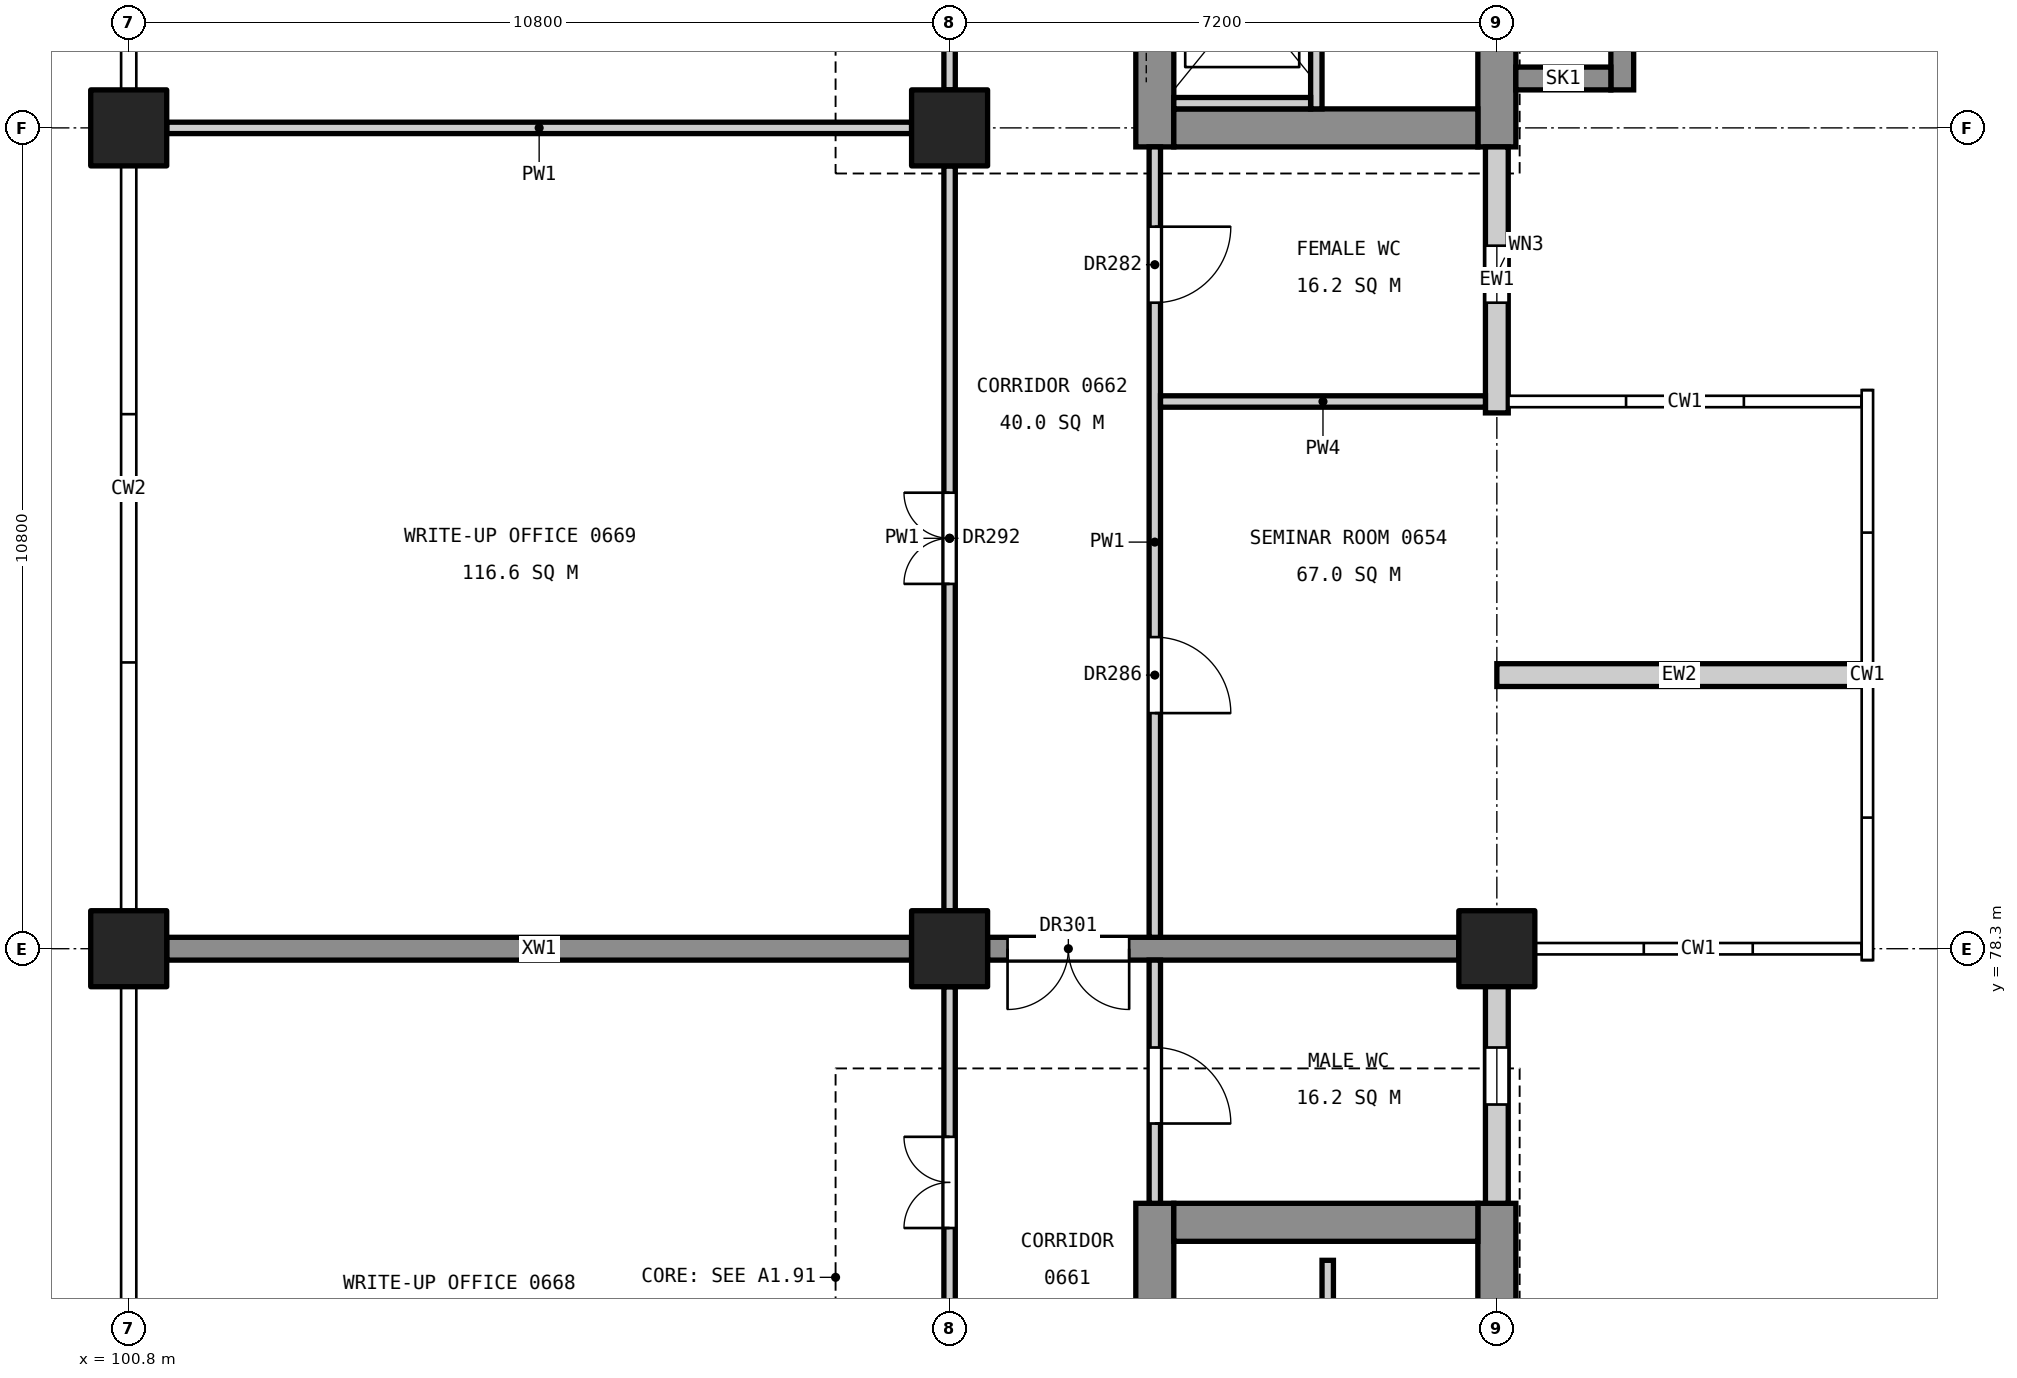
"""IFC4 building model, lengths in metres.
Left out: names, types, materials, properties, quantities, classifications, styles, units other than length and angle.
Written with IfcOpenShell. Run it as: python <this file> out.ifc"""

import sys

from ifc_helpers import new_model, si_unit, direction, frame, frame_2d, origin, origin_2d, place, context, subcontext, project, spatial, rectangle, extrude, element, fill, save


model = new_model("IFC4")
c1 = context("Model", 3, precision=1e-05, world=origin(), true_north=direction((0.0, 1.0)))
c2 = subcontext(c1, "Body", "Model", "MODEL_VIEW")
j1 = project(units=[si_unit("LENGTHUNIT", "METRE"), si_unit("PLANEANGLEUNIT", "RADIAN")], contexts=[c1])
p1 = place(None, origin())
s1 = spatial("IfcSite", under=j1, at=p1, CompositionType="ELEMENT")
p2 = place(p1, origin())
s2 = spatial("IfcBuilding", under=s1, at=p2, CompositionType="ELEMENT")
p3 = place(p2, frame((0.0, 0.0, 31.8)))
s3 = spatial("IfcBuildingStorey", under=s2, at=p3, CompositionType="ELEMENT", Elevation=31.8)
for number, where, z_axis, x_axis in (
    (1, (118.8, 78.3, 0.0), (0.0, 0.0, 1.0), (1.0, 0.0, 0.0)),
    (2, (111.6, 78.3, 0.0), (0.0, 0.0, 1.0), (1.0, 0.0, 0.0)),
    (3, (111.6, 89.1, 0.0), (0.0, 0.0, 1.0), (1.0, 0.0, 0.0)),
    (4, (100.8, 78.3, 0.0), (0.0, 0.0, 1.0), (1.0, 0.0, 0.0)),
    (5, (100.8, 89.1, 0.0), (0.0, 0.0, 1.0), (1.0, 0.0, 0.0)),
):
    element("IfcColumn", number, at=place(p3, frame(where, z_axis=z_axis, x_axis=x_axis)), inside=s3, PredefinedType="COLUMN", context=c2, shape_type="SweptSolid", body=[
        extrude(rectangle(XDim=1.0, YDim=1.0, at=origin_2d()), origin(), (0.0, 0.0, 1.0), 4.8),
    ])
p4 = place(p3, frame((118.8, 60.05, 0.0), z_axis=(0.0, 0.0, 1.0), x_axis=(0.0, 1.0, 0.0)))
e6 = element("IfcWall", 6, at=p4, inside=s3, PredefinedType="SHEAR", context=c2, shape_type="SweptSolid", body=[
    extrude(rectangle(XDim=14.9, YDim=0.5, at=frame_2d((7.45, 0.0))), origin(), (0.0, 0.0, 1.0), 4.55),
])
p5 = place(p4, frame((6.16, 0.0, 3.4)))
e7 = element("IfcOpeningElement", 7, at=p5, cuts=e6, PredefinedType="OPENING", context=c2, shape_type="SweptSolid", body=[
    extrude(rectangle(XDim=1.2, YDim=0.9, at=frame_2d((0.6, 0.45))), frame((0.0, 0.26, 0.0), z_axis=(0.0, -1.0, 0.0), x_axis=(1.0, 0.0, 0.0)), (0.0, 0.0, 1.0), 0.52),
])
p6 = place(p3, frame((114.3, 60.05, 0.0), z_axis=(0.0, 0.0, 1.0), x_axis=(0.0, 1.0, 0.0)))
e8 = element("IfcWall", 8, at=p6, inside=s3, PredefinedType="SHEAR", context=c2, shape_type="SweptSolid", body=[
    extrude(rectangle(XDim=14.9, YDim=0.5, at=frame_2d((7.45, 0.0))), origin(), (0.0, 0.0, 1.0), 4.55),
])
p7 = place(p6, frame((0.55, 0.0, 0.0)))
e9 = element("IfcOpeningElement", 9, at=p7, cuts=e8, PredefinedType="OPENING", context=c2, shape_type="SweptSolid", body=[
    extrude(rectangle(XDim=1.4, YDim=2.1, at=frame_2d((0.7, 1.05))), frame((0.0, 0.26, 0.0), z_axis=(0.0, -1.0, 0.0), x_axis=(1.0, 0.0, 0.0)), (0.0, 0.0, 1.0), 0.52),
])
p8 = place(p6, frame((8.85, 0.0, 0.0)))
e10 = element("IfcOpeningElement", 10, at=p8, cuts=e8, PredefinedType="OPENING", context=c2, shape_type="SweptSolid", body=[
    extrude(rectangle(XDim=1.1, YDim=2.1, at=frame_2d((0.55, 1.05))), frame((0.0, 0.26, 0.0), z_axis=(0.0, -1.0, 0.0), x_axis=(1.0, 0.0, 0.0)), (0.0, 0.0, 1.0), 0.52),
])
p9 = place(p6, frame((11.4, 0.0, 0.0)))
e11 = element("IfcOpeningElement", 11, at=p9, cuts=e8, PredefinedType="OPENING", context=c2, shape_type="SweptSolid", body=[
    extrude(rectangle(XDim=1.1, YDim=2.1, at=frame_2d((0.55, 1.05))), frame((0.0, 0.26, 0.0), z_axis=(0.0, -1.0, 0.0), x_axis=(1.0, 0.0, 0.0)), (0.0, 0.0, 1.0), 0.52),
])
p10 = place(p3, frame((118.55, 74.7, 0.0), z_axis=(0.0, 0.0, 1.0), x_axis=(-1.0, 0.0, 0.0)))
e12 = element("IfcWall", 12, at=p10, inside=s3, PredefinedType="SHEAR", context=c2, shape_type="SweptSolid", body=[
    extrude(rectangle(XDim=4.0, YDim=0.5, at=frame_2d((2.0, 0.0))), origin(), (0.0, 0.0, 1.0), 4.55),
])
p11 = place(p3, frame((118.8, 88.85, 0.0), z_axis=(0.0, 0.0, 1.0), x_axis=(0.0, 1.0, 0.0)))
e13 = element("IfcWall", 13, at=p11, inside=s3, PredefinedType="SHEAR", context=c2, shape_type="SweptSolid", body=[
    extrude(rectangle(XDim=11.3, YDim=0.5, at=frame_2d((5.65, 0.0))), origin(), (0.0, 0.0, 1.0), 4.55),
])
p12 = place(p11, frame((3.94, 0.0, 3.4)))
e14 = element("IfcOpeningElement", 14, at=p12, cuts=e13, PredefinedType="OPENING", context=c2, shape_type="SweptSolid", body=[
    extrude(rectangle(XDim=1.2, YDim=0.9, at=frame_2d((0.6, 0.45))), frame((0.0, 0.26, 0.0), z_axis=(0.0, -1.0, 0.0), x_axis=(1.0, 0.0, 0.0)), (0.0, 0.0, 1.0), 0.52),
])
p13 = place(p3, frame((114.3, 88.85, 0.0), z_axis=(0.0, 0.0, 1.0), x_axis=(0.0, 1.0, 0.0)))
e15 = element("IfcWall", 15, at=p13, inside=s3, PredefinedType="SHEAR", context=c2, shape_type="SweptSolid", body=[
    extrude(rectangle(XDim=11.3, YDim=0.5, at=frame_2d((5.65, 0.0))), origin(), (0.0, 0.0, 1.0), 4.55),
])
p14 = place(p13, frame((9.35, 0.0, 0.0)))
e16 = element("IfcOpeningElement", 16, at=p14, cuts=e15, PredefinedType="OPENING", context=c2, shape_type="SweptSolid", body=[
    extrude(rectangle(XDim=1.4, YDim=2.1, at=frame_2d((0.7, 1.05))), frame((0.0, 0.26, 0.0), z_axis=(0.0, -1.0, 0.0), x_axis=(1.0, 0.0, 0.0)), (0.0, 0.0, 1.0), 0.52),
])
p15 = place(p13, frame((1.4, 0.0, 0.0)))
e17 = element("IfcOpeningElement", 17, at=p15, cuts=e15, PredefinedType="OPENING", context=c2, shape_type="SweptSolid", body=[
    extrude(rectangle(XDim=1.1, YDim=2.1, at=frame_2d((0.55, 1.05))), frame((0.0, 0.26, 0.0), z_axis=(0.0, -1.0, 0.0), x_axis=(1.0, 0.0, 0.0)), (0.0, 0.0, 1.0), 0.52),
])
p16 = place(p3, frame((118.55, 89.1, 0.0), z_axis=(0.0, 0.0, 1.0), x_axis=(-1.0, 0.0, 0.0)))
e18 = element("IfcWall", 18, at=p16, inside=s3, PredefinedType="SHEAR", context=c2, shape_type="SweptSolid", body=[
    extrude(rectangle(XDim=4.0, YDim=0.5, at=frame_2d((2.0, 0.0))), origin(), (0.0, 0.0, 1.0), 4.55),
])
p17 = place(p3, frame((120.45, 89.6, 0.0), z_axis=(0.0, 0.0, 1.0), x_axis=(0.0, 1.0, 0.0)))
e19 = element("IfcWall", 19, at=p17, inside=s3, PredefinedType="SHEAR", context=c2, shape_type="SweptSolid", body=[
    extrude(rectangle(XDim=2.4, YDim=0.3, at=frame_2d((1.2, 0.0))), origin(), (0.0, 0.0, 1.0), 4.8),
])
p18 = place(p3, frame((119.05, 89.75, 0.0), z_axis=(0.0, 0.0, 1.0), x_axis=(1.0, 0.0, 0.0)))
e20 = element("IfcWall", 20, at=p18, inside=s3, PredefinedType="SHEAR", context=c2, shape_type="SweptSolid", body=[
    extrude(rectangle(XDim=1.25, YDim=0.3, at=frame_2d((0.625, 0.0))), origin(), (0.0, 0.0, 1.0), 4.8),
])
p19 = place(p3, frame((118.3, 78.3, 0.0), z_axis=(0.0, 0.0, 1.0), x_axis=(-1.0, 0.0, 0.0)))
e21 = element("IfcWall", 21, at=p19, inside=s3, PredefinedType="SHEAR", context=c2, shape_type="SweptSolid", body=[
    extrude(rectangle(XDim=6.2, YDim=0.3, at=frame_2d((3.1, 0.0))), origin(), (0.0, 0.0, 1.0), 4.55),
])
p20 = place(p19, frame((4.337, 0.0, 0.0)))
e22 = element("IfcOpeningElement", 22, at=p20, cuts=e21, PredefinedType="OPENING", context=c2, shape_type="SweptSolid", body=[
    extrude(rectangle(XDim=1.6, YDim=2.1, at=frame_2d((0.8, 1.05))), frame((0.0, 0.16, 0.0), z_axis=(0.0, -1.0, 0.0), x_axis=(1.0, 0.0, 0.0)), (0.0, 0.0, 1.0), 0.32),
])
p21 = place(p3, frame((111.1, 78.3, 0.0), z_axis=(0.0, 0.0, 1.0), x_axis=(-1.0, 0.0, 0.0)))
e23 = element("IfcWall", 23, at=p21, inside=s3, PredefinedType="SHEAR", context=c2, shape_type="SweptSolid", body=[
    extrude(rectangle(XDim=9.8, YDim=0.3, at=frame_2d((4.9, 0.0))), origin(), (0.0, 0.0, 1.0), 4.55),
])
p22 = place(p3, frame((116.425, 92.0, 0.0), z_axis=(0.0, 0.0, 1.0), x_axis=(0.0, -1.0, 0.0)))
e24 = element("IfcWall", 24, at=p22, inside=s3, PredefinedType="SOLIDWALL", context=c2, shape_type="SweptSolid", body=[
    extrude(rectangle(XDim=2.65, YDim=0.15, at=frame_2d((1.325, 0.0))), origin(), (0.0, 0.0, 1.0), 4.8),
])
p23 = place(p3, frame((116.35, 89.425, 0.0), z_axis=(0.0, 0.0, 1.0), x_axis=(-1.0, 0.0, 0.0)))
e25 = element("IfcWall", 25, at=p23, inside=s3, PredefinedType="SOLIDWALL", context=c2, shape_type="SweptSolid", body=[
    extrude(rectangle(XDim=1.8, YDim=0.15, at=frame_2d((0.9, 0.0))), origin(), (0.0, 0.0, 1.0), 4.8),
])
p24 = place(p3, frame((116.575, 73.3, 0.0), z_axis=(0.0, 0.0, 1.0), x_axis=(0.0, 1.0, 0.0)))
e26 = element("IfcWall", 26, at=p24, inside=s3, PredefinedType="SOLIDWALL", context=c2, shape_type="SweptSolid", body=[
    extrude(rectangle(XDim=0.9, YDim=0.15, at=frame_2d((0.45, 0.0))), origin(), (0.0, 0.0, 1.0), 4.8),
])
p25 = place(p3, frame((118.8, 74.95, 0.0), z_axis=(0.0, 0.0, 1.0), x_axis=(0.0, 1.0, 0.0)))
e27 = element("IfcWall", 27, at=p25, inside=s3, PredefinedType="STANDARD", context=c2, shape_type="SweptSolid", body=[
    extrude(rectangle(XDim=3.5, YDim=0.3, at=frame_2d((1.75, 0.0))), origin(), (0.0, 0.0, 1.0), 3.65),
])
p26 = place(p25, frame((1.3, 0.0, 0.8)))
e28 = element("IfcOpeningElement", 28, at=p26, cuts=e27, PredefinedType="OPENING", context=c2, shape_type="SweptSolid", body=[
    extrude(rectangle(XDim=0.75, YDim=1.2, at=frame_2d((0.375, 0.6))), frame((0.0, 0.16, 0.0), z_axis=(0.0, -1.0, 0.0), x_axis=(1.0, 0.0, 0.0)), (0.0, 0.0, 1.0), 0.32),
])
p27 = place(p3, frame((118.8, 85.35, 0.0), z_axis=(0.0, 0.0, 1.0), x_axis=(0.0, 1.0, 0.0)))
e29 = element("IfcWall", 29, at=p27, inside=s3, PredefinedType="STANDARD", context=c2, shape_type="SweptSolid", body=[
    extrude(rectangle(XDim=3.5, YDim=0.3, at=frame_2d((1.75, 0.0))), origin(), (0.0, 0.0, 1.0), 3.65),
])
p28 = place(p27, frame((1.45, 0.0, 0.8)))
e30 = element("IfcOpeningElement", 30, at=p28, cuts=e29, PredefinedType="OPENING", context=c2, shape_type="SweptSolid", body=[
    extrude(rectangle(XDim=0.75, YDim=1.2, at=frame_2d((0.375, 0.6))), frame((0.0, 0.16, 0.0), z_axis=(0.0, -1.0, 0.0), x_axis=(1.0, 0.0, 0.0)), (0.0, 0.0, 1.0), 0.32),
])
p29 = place(p3, frame((123.6, 81.9, 0.0), z_axis=(0.0, 0.0, 1.0), x_axis=(-1.0, 0.0, 0.0)))
e31 = element("IfcWall", 31, at=p29, inside=s3, PredefinedType="STANDARD", context=c2, shape_type="SweptSolid", body=[
    extrude(rectangle(XDim=4.8, YDim=0.3, at=frame_2d((2.4, 0.0))), origin(), (0.0, 0.0, 1.0), 3.65),
])
p30 = place(p3, frame((114.3, 74.95, 0.0), z_axis=(0.0, 0.0, 1.0), x_axis=(0.0, 1.0, 0.0)))
e32 = element("IfcWall", 32, at=p30, inside=s3, PredefinedType="PARTITIONING", context=c2, shape_type="SweptSolid", body=[
    extrude(rectangle(XDim=3.2, YDim=0.15, at=frame_2d((1.6, 0.0))), origin(), (0.0, 0.0, 1.0), 3.55),
])
p31 = place(p30, frame((1.05, 0.0, 0.0)))
e33 = element("IfcOpeningElement", 33, at=p31, cuts=e32, PredefinedType="OPENING", context=c2, shape_type="SweptSolid", body=[
    extrude(rectangle(XDim=1.0, YDim=2.1, at=frame_2d((0.5, 1.05))), frame((0.0, 0.085, 0.0), z_axis=(0.0, -1.0, 0.0), x_axis=(1.0, 0.0, 0.0)), (0.0, 0.0, 1.0), 0.17),
])
p32 = place(p3, frame((114.3, 78.45, 0.0), z_axis=(0.0, 0.0, 1.0), x_axis=(0.0, 1.0, 0.0)))
e34 = element("IfcWall", 34, at=p32, inside=s3, PredefinedType="PARTITIONING", context=c2, shape_type="SweptSolid", body=[
    extrude(rectangle(XDim=10.4, YDim=0.15, at=frame_2d((5.2, 0.0))), origin(), (0.0, 0.0, 1.0), 3.55),
])
p33 = place(p32, frame((8.35, 0.0, 0.0)))
e35 = element("IfcOpeningElement", 35, at=p33, cuts=e34, PredefinedType="OPENING", context=c2, shape_type="SweptSolid", body=[
    extrude(rectangle(XDim=1.0, YDim=2.1, at=frame_2d((0.5, 1.05))), frame((0.0, 0.085, 0.0), z_axis=(0.0, -1.0, 0.0), x_axis=(1.0, 0.0, 0.0)), (0.0, 0.0, 1.0), 0.17),
])
p34 = place(p32, frame((2.95, 0.0, 0.0)))
e36 = element("IfcOpeningElement", 36, at=p34, cuts=e34, PredefinedType="OPENING", context=c2, shape_type="SweptSolid", body=[
    extrude(rectangle(XDim=1.0, YDim=2.1, at=frame_2d((0.5, 1.05))), frame((0.0, 0.085, 0.0), z_axis=(0.0, -1.0, 0.0), x_axis=(1.0, 0.0, 0.0)), (0.0, 0.0, 1.0), 0.17),
])
p35 = place(p3, frame((118.65, 85.5, 0.0), z_axis=(0.0, 0.0, 1.0), x_axis=(-1.0, 0.0, 0.0)))
e37 = element("IfcWall", 37, at=p35, inside=s3, PredefinedType="PARTITIONING", context=c2, shape_type="SweptSolid", body=[
    extrude(rectangle(XDim=4.275, YDim=0.15, at=frame_2d((2.137, 0.0))), origin(), (0.0, 0.0, 1.0), 3.85),
])
p36 = place(p3, frame((111.6, 78.8, 0.0), z_axis=(0.0, 0.0, 1.0), x_axis=(0.0, 1.0, 0.0)))
e38 = element("IfcWall", 38, at=p36, inside=s3, PredefinedType="PARTITIONING", context=c2, shape_type="SweptSolid", body=[
    extrude(rectangle(XDim=9.8, YDim=0.15, at=frame_2d((4.9, 0.0))), origin(), (0.0, 0.0, 1.0), 3.55),
])
p37 = place(p36, frame((4.3, 0.0, 0.0)))
e39 = element("IfcOpeningElement", 39, at=p37, cuts=e38, PredefinedType="OPENING", context=c2, shape_type="SweptSolid", body=[
    extrude(rectangle(XDim=1.2, YDim=2.1, at=frame_2d((0.6, 1.05))), frame((0.0, 0.085, 0.0), z_axis=(0.0, -1.0, 0.0), x_axis=(1.0, 0.0, 0.0)), (0.0, 0.0, 1.0), 0.17),
])
p38 = place(p3, frame((111.6, 89.6, 0.0), z_axis=(0.0, 0.0, 1.0), x_axis=(0.0, 1.0, 0.0)))
e40 = element("IfcWall", 40, at=p38, inside=s3, PredefinedType="PARTITIONING", context=c2, shape_type="SweptSolid", body=[
    extrude(rectangle(XDim=3.5, YDim=0.15, at=frame_2d((1.75, 0.0))), origin(), (0.0, 0.0, 1.0), 3.55),
])
p39 = place(p38, frame((1.15, 0.0, 0.0)))
e41 = element("IfcOpeningElement", 41, at=p39, cuts=e40, PredefinedType="OPENING", context=c2, shape_type="SweptSolid", body=[
    extrude(rectangle(XDim=1.2, YDim=2.1, at=frame_2d((0.6, 1.05))), frame((0.0, 0.085, 0.0), z_axis=(0.0, -1.0, 0.0), x_axis=(1.0, 0.0, 0.0)), (0.0, 0.0, 1.0), 0.17),
])
p40 = place(p3, frame((111.6, 72.65, 0.0), z_axis=(0.0, 0.0, 1.0), x_axis=(0.0, 1.0, 0.0)))
e42 = element("IfcWall", 42, at=p40, inside=s3, PredefinedType="PARTITIONING", context=c2, shape_type="SweptSolid", body=[
    extrude(rectangle(XDim=5.15, YDim=0.15, at=frame_2d((2.575, 0.0))), origin(), (0.0, 0.0, 1.0), 3.55),
])
p41 = place(p40, frame((1.975, 0.0, 0.0)))
e43 = element("IfcOpeningElement", 43, at=p41, cuts=e42, PredefinedType="OPENING", context=c2, shape_type="SweptSolid", body=[
    extrude(rectangle(XDim=1.2, YDim=2.1, at=frame_2d((0.6, 1.05))), frame((0.0, 0.085, 0.0), z_axis=(0.0, -1.0, 0.0), x_axis=(1.0, 0.0, 0.0)), (0.0, 0.0, 1.0), 0.17),
])
p42 = place(p3, frame((111.1, 89.1, 0.0), z_axis=(0.0, 0.0, 1.0), x_axis=(-1.0, 0.0, 0.0)))
e44 = element("IfcWall", 44, at=p42, inside=s3, PredefinedType="PARTITIONING", context=c2, shape_type="SweptSolid", body=[
    extrude(rectangle(XDim=9.8, YDim=0.15, at=frame_2d((4.9, 0.0))), origin(), (0.0, 0.0, 1.0), 3.85),
])
p43 = place(p26, origin())
e45 = element("IfcWindow", 45, at=p43, inside=s3, PartitioningType="SINGLE_PANEL", PredefinedType="WINDOW", context=c2, shape_type="SweptSolid", body=[
    extrude(rectangle(XDim=0.75, YDim=1.2, at=frame_2d((0.375, 0.6))), frame((0.0, 0.03, 0.0), z_axis=(0.0, -1.0, 0.0), x_axis=(1.0, 0.0, 0.0)), (0.0, 0.0, 1.0), 0.06),
])
fill(e28, e45)
p44 = place(p28, origin())
e46 = element("IfcWindow", 46, at=p44, inside=s3, PartitioningType="SINGLE_PANEL", PredefinedType="WINDOW", context=c2, shape_type="SweptSolid", body=[
    extrude(rectangle(XDim=0.75, YDim=1.2, at=frame_2d((0.375, 0.6))), frame((0.0, 0.03, 0.0), z_axis=(0.0, -1.0, 0.0), x_axis=(1.0, 0.0, 0.0)), (0.0, 0.0, 1.0), 0.06),
])
fill(e30, e46)
p45 = place(p33, frame((1.0, 0.0, 0.0), z_axis=(0.0, 0.0, 1.0), x_axis=(-1.0, 0.0, 0.0)))
e47 = element("IfcDoor", 47, at=p45, inside=s3, OperationType="SINGLE_SWING_LEFT", PredefinedType="DOOR", context=c2, shape_type="SweptSolid", body=[
    extrude(rectangle(XDim=1.0, YDim=2.1, at=frame_2d((0.5, 1.05))), frame((0.0, 0.025, 0.0), z_axis=(0.0, -1.0, 0.0), x_axis=(1.0, 0.0, 0.0)), (0.0, 0.0, 1.0), 0.05),
])
fill(e35, e47)
p46 = place(p31, frame((1.0, 0.0, 0.0), z_axis=(0.0, 0.0, 1.0), x_axis=(-1.0, 0.0, 0.0)))
e48 = element("IfcDoor", 48, at=p46, inside=s3, OperationType="SINGLE_SWING_RIGHT", PredefinedType="DOOR", context=c2, shape_type="SweptSolid", body=[
    extrude(rectangle(XDim=1.0, YDim=2.1, at=frame_2d((0.5, 1.05))), frame((0.0, 0.025, 0.0), z_axis=(0.0, -1.0, 0.0), x_axis=(1.0, 0.0, 0.0)), (0.0, 0.0, 1.0), 0.05),
])
fill(e33, e48)
p47 = place(p34, frame((1.0, 0.0, 0.0), z_axis=(0.0, 0.0, 1.0), x_axis=(-1.0, 0.0, 0.0)))
e49 = element("IfcDoor", 49, at=p47, inside=s3, OperationType="SINGLE_SWING_RIGHT", PredefinedType="DOOR", context=c2, shape_type="SweptSolid", body=[
    extrude(rectangle(XDim=1.0, YDim=2.1, at=frame_2d((0.5, 1.05))), frame((0.0, 0.025, 0.0), z_axis=(0.0, -1.0, 0.0), x_axis=(1.0, 0.0, 0.0)), (0.0, 0.0, 1.0), 0.05),
])
fill(e36, e49)
p48 = place(p41, origin())
e50 = element("IfcDoor", 50, at=p48, inside=s3, OperationType="DOUBLE_DOOR_SINGLE_SWING", PredefinedType="DOOR", context=c2, shape_type="SweptSolid", body=[
    extrude(rectangle(XDim=1.2, YDim=2.1, at=frame_2d((0.6, 1.05))), frame((0.0, 0.025, 0.0), z_axis=(0.0, -1.0, 0.0), x_axis=(1.0, 0.0, 0.0)), (0.0, 0.0, 1.0), 0.05),
])
fill(e43, e50)
p49 = place(p37, origin())
e51 = element("IfcDoor", 51, at=p49, inside=s3, OperationType="DOUBLE_DOOR_SINGLE_SWING", PredefinedType="DOOR", context=c2, shape_type="SweptSolid", body=[
    extrude(rectangle(XDim=1.2, YDim=2.1, at=frame_2d((0.6, 1.05))), frame((0.0, 0.025, 0.0), z_axis=(0.0, -1.0, 0.0), x_axis=(1.0, 0.0, 0.0)), (0.0, 0.0, 1.0), 0.05),
])
fill(e39, e51)
p50 = place(p20, origin())
e52 = element("IfcDoor", 52, at=p50, inside=s3, OperationType="DOUBLE_DOOR_SINGLE_SWING", PredefinedType="DOOR", context=c2, shape_type="SweptSolid", body=[
    extrude(rectangle(XDim=1.6, YDim=2.1, at=frame_2d((0.8, 1.05))), frame((0.0, 0.025, 0.0), z_axis=(0.0, -1.0, 0.0), x_axis=(1.0, 0.0, 0.0)), (0.0, 0.0, 1.0), 0.05),
])
fill(e22, e52)
save(model, sys.argv[1])
